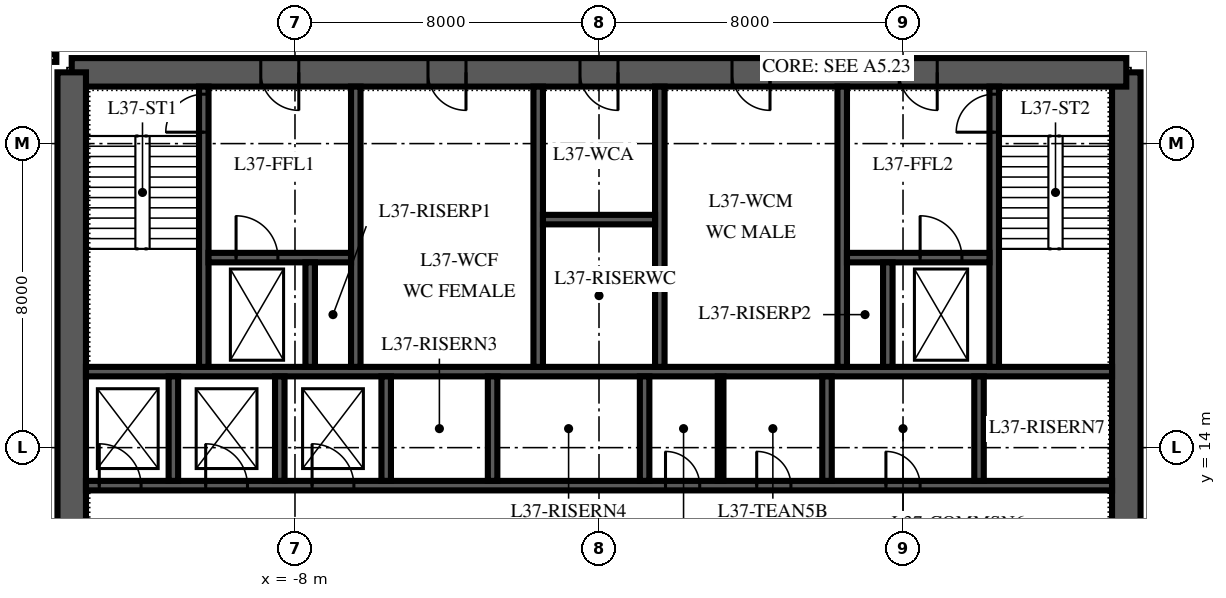
"""IFC4 building model, lengths in metres.
Left out: names, types, materials, properties, quantities, classifications, styles, units other than length and angle.
Written with IfcOpenShell. Run it as: python <this file> out.ifc"""

import sys

from ifc_helpers import new_model, si_unit, direction, frame, frame_2d, origin, place, context, subcontext, project, spatial, polyline, rectangle, outline, extrude, element, fill, save


model = new_model("IFC4")
c1 = context("Model", 3, precision=1e-05, world=origin(), true_north=direction((0.0, 1.0)))
c2 = subcontext(c1, "Body", "Model", "MODEL_VIEW")
j1 = project(units=[si_unit("LENGTHUNIT", "METRE"), si_unit("PLANEANGLEUNIT", "RADIAN")], contexts=[c1])
p1 = place(None, origin())
s1 = spatial("IfcSite", under=j1, at=p1, CompositionType="ELEMENT")
p2 = place(p1, origin())
s2 = spatial("IfcBuilding", under=s1, at=p2, CompositionType="ELEMENT")
p3 = place(p2, frame((0.0, 0.0, 163.0)))
s3 = spatial("IfcBuildingStorey", under=s2, at=p3, CompositionType="ELEMENT", Elevation=163.0)
p4 = place(p3, frame((13.875, 6.125, 0.0), z_axis=(0.0, 0.0, 1.0), x_axis=(0.0, 1.0, 0.0)))
e1 = element("IfcWall", 1, at=p4, inside=s3, PredefinedType="SHEAR", context=c2, shape_type="SweptSolid", body=[
    extrude(outline(polyline([(0.0, -0.375), (17.75, -0.375), (17.75, 0.0), (17.375, 0.0), (17.375, 0.375), (0.375, 0.375), (0.375, 0.0), (0.0, 0.0), (0.0, -0.375)])), origin(), (0.0, 0.0, 1.0), 4.0),
])
p5 = place(p4, frame((4.175, 0.0, 0.0)))
e2 = element("IfcOpeningElement", 2, at=p5, cuts=e1, PredefinedType="OPENING", context=c2, shape_type="SweptSolid", body=[
    extrude(rectangle(XDim=1.8, YDim=2.4, at=frame_2d((0.9, 1.2))), frame((0.0, 0.39, 0.0), z_axis=(0.0, -1.0, 0.0), x_axis=(1.0, 0.0, 0.0)), (0.0, 0.0, 1.0), 0.78),
])
p6 = place(p3, frame((13.875, 23.875, 0.0), z_axis=(0.0, 0.0, 1.0), x_axis=(-1.0, 0.0, 0.0)))
e3 = element("IfcWall", 3, at=p6, inside=s3, PredefinedType="SHEAR", context=c2, shape_type="SweptSolid", body=[
    extrude(rectangle(XDim=27.75, YDim=0.75, at=frame_2d((13.875, 0.0))), origin(), (0.0, 0.0, 1.0), 4.0),
])
p7 = place(p6, frame((21.775, 0.0, 0.0)))
e4 = element("IfcOpeningElement", 4, at=p7, cuts=e3, PredefinedType="OPENING", context=c2, shape_type="SweptSolid", body=[
    extrude(rectangle(XDim=1.0, YDim=2.1, at=frame_2d((0.5, 1.05))), frame((0.0, 0.39, 0.0), z_axis=(0.0, -1.0, 0.0), x_axis=(1.0, 0.0, 0.0)), (0.0, 0.0, 1.0), 0.78),
])
p8 = place(p6, frame((4.975, 0.0, 0.0)))
e5 = element("IfcOpeningElement", 5, at=p8, cuts=e3, PredefinedType="OPENING", context=c2, shape_type="SweptSolid", body=[
    extrude(rectangle(XDim=1.0, YDim=2.1, at=frame_2d((0.5, 1.05))), frame((0.0, 0.39, 0.0), z_axis=(0.0, -1.0, 0.0), x_axis=(1.0, 0.0, 0.0)), (0.0, 0.0, 1.0), 0.78),
])
p9 = place(p6, frame((17.375, 0.0, 0.0)))
e6 = element("IfcOpeningElement", 6, at=p9, cuts=e3, PredefinedType="OPENING", context=c2, shape_type="SweptSolid", body=[
    extrude(rectangle(XDim=1.0, YDim=2.1, at=frame_2d((0.5, 1.05))), frame((0.0, 0.39, 0.0), z_axis=(0.0, -1.0, 0.0), x_axis=(1.0, 0.0, 0.0)), (0.0, 0.0, 1.0), 0.78),
])
p10 = place(p6, frame((13.375, 0.0, 0.0)))
e7 = element("IfcOpeningElement", 7, at=p10, cuts=e3, PredefinedType="OPENING", context=c2, shape_type="SweptSolid", body=[
    extrude(rectangle(XDim=1.0, YDim=2.1, at=frame_2d((0.5, 1.05))), frame((0.0, 0.39, 0.0), z_axis=(0.0, -1.0, 0.0), x_axis=(1.0, 0.0, 0.0)), (0.0, 0.0, 1.0), 0.78),
])
p11 = place(p6, frame((9.375, 0.0, 0.0)))
e8 = element("IfcOpeningElement", 8, at=p11, cuts=e3, PredefinedType="OPENING", context=c2, shape_type="SweptSolid", body=[
    extrude(rectangle(XDim=1.0, YDim=2.1, at=frame_2d((0.5, 1.05))), frame((0.0, 0.39, 0.0), z_axis=(0.0, -1.0, 0.0), x_axis=(1.0, 0.0, 0.0)), (0.0, 0.0, 1.0), 0.78),
])
p12 = place(p3, frame((-13.875, 23.875, 0.0), z_axis=(0.0, 0.0, 1.0), x_axis=(0.0, -1.0, 0.0)))
e9 = element("IfcWall", 9, at=p12, inside=s3, PredefinedType="SHEAR", context=c2, shape_type="SweptSolid", body=[
    extrude(outline(polyline([(0.0, -0.375), (17.75, -0.375), (17.75, 0.0), (17.375, 0.0), (17.375, 0.375), (0.375, 0.375), (0.375, 0.0), (0.0, 0.0), (0.0, -0.375)])), origin(), (0.0, 0.0, 1.0), 4.0),
])
p13 = place(p12, frame((11.775, 0.0, 0.0)))
e10 = element("IfcOpeningElement", 10, at=p13, cuts=e9, PredefinedType="OPENING", context=c2, shape_type="SweptSolid", body=[
    extrude(rectangle(XDim=1.8, YDim=2.4, at=frame_2d((0.9, 1.2))), frame((0.0, 0.39, 0.0), z_axis=(0.0, -1.0, 0.0), x_axis=(1.0, 0.0, 0.0)), (0.0, 0.0, 1.0), 0.78),
])
p14 = place(p3, frame((-13.5, 13.0, 0.0), z_axis=(0.0, 0.0, 1.0), x_axis=(1.0, 0.0, 0.0)))
e11 = element("IfcWall", 11, at=p14, inside=s3, PredefinedType="SHEAR", context=c2, shape_type="SweptSolid", body=[
    extrude(rectangle(XDim=27.0, YDim=0.25, at=frame_2d((13.5, 0.0))), origin(), (0.0, 0.0, 1.0), 4.0),
])
p15 = place(p14, frame((0.35, 0.0, 0.0)))
e12 = element("IfcOpeningElement", 12, at=p15, cuts=e11, PredefinedType="OPENING", context=c2, shape_type="SweptSolid", body=[
    extrude(rectangle(XDim=1.1, YDim=2.1, at=frame_2d((0.55, 1.05))), frame((0.0, 0.14, 0.0), z_axis=(0.0, -1.0, 0.0), x_axis=(1.0, 0.0, 0.0)), (0.0, 0.0, 1.0), 0.28),
])
p16 = place(p14, frame((3.15, 0.0, 0.0)))
e13 = element("IfcOpeningElement", 13, at=p16, cuts=e11, PredefinedType="OPENING", context=c2, shape_type="SweptSolid", body=[
    extrude(rectangle(XDim=1.1, YDim=2.1, at=frame_2d((0.55, 1.05))), frame((0.0, 0.14, 0.0), z_axis=(0.0, -1.0, 0.0), x_axis=(1.0, 0.0, 0.0)), (0.0, 0.0, 1.0), 0.28),
])
p17 = place(p14, frame((5.95, 0.0, 0.0)))
e14 = element("IfcOpeningElement", 14, at=p17, cuts=e11, PredefinedType="OPENING", context=c2, shape_type="SweptSolid", body=[
    extrude(rectangle(XDim=1.1, YDim=2.1, at=frame_2d((0.55, 1.05))), frame((0.0, 0.14, 0.0), z_axis=(0.0, -1.0, 0.0), x_axis=(1.0, 0.0, 0.0)), (0.0, 0.0, 1.0), 0.28),
])
p18 = place(p14, frame((15.25, 0.0, 0.0)))
e15 = element("IfcOpeningElement", 15, at=p18, cuts=e11, PredefinedType="OPENING", context=c2, shape_type="SweptSolid", body=[
    extrude(rectangle(XDim=0.9, YDim=2.1, at=frame_2d((0.45, 1.05))), frame((0.0, 0.14, 0.0), z_axis=(0.0, -1.0, 0.0), x_axis=(1.0, 0.0, 0.0)), (0.0, 0.0, 1.0), 0.28),
])
p19 = place(p14, frame((17.65, 0.0, 0.0)))
e16 = element("IfcOpeningElement", 16, at=p19, cuts=e11, PredefinedType="OPENING", context=c2, shape_type="SweptSolid", body=[
    extrude(rectangle(XDim=0.9, YDim=2.1, at=frame_2d((0.45, 1.05))), frame((0.0, 0.14, 0.0), z_axis=(0.0, -1.0, 0.0), x_axis=(1.0, 0.0, 0.0)), (0.0, 0.0, 1.0), 0.28),
])
p20 = place(p14, frame((21.05, 0.0, 0.0)))
e17 = element("IfcOpeningElement", 17, at=p20, cuts=e11, PredefinedType="OPENING", context=c2, shape_type="SweptSolid", body=[
    extrude(rectangle(XDim=0.9, YDim=2.1, at=frame_2d((0.45, 1.05))), frame((0.0, 0.14, 0.0), z_axis=(0.0, -1.0, 0.0), x_axis=(1.0, 0.0, 0.0)), (0.0, 0.0, 1.0), 0.28),
])
p21 = place(p3, frame((-13.5, 16.0, 0.0), z_axis=(0.0, 0.0, 1.0), x_axis=(1.0, 0.0, 0.0)))
e18 = element("IfcWall", 18, at=p21, inside=s3, PredefinedType="SHEAR", context=c2, shape_type="SweptSolid", body=[
    extrude(rectangle(XDim=27.0, YDim=0.25, at=frame_2d((13.5, 0.0))), origin(), (0.0, 0.0, 1.0), 4.0),
])
for number, where, z_axis, x_axis in (
    (19, (-11.2, 13.125, 0.0), (0.0, 0.0, 1.0), (0.0, 1.0, 0.0)),
    (20, (-8.4, 13.125, 0.0), (0.0, 0.0, 1.0), (0.0, 1.0, 0.0)),
    (21, (-5.6, 13.125, 0.0), (0.0, 0.0, 1.0), (0.0, 1.0, 0.0)),
    (22, (-2.8, 13.125, 0.0), (0.0, 0.0, 1.0), (0.0, 1.0, 0.0)),
    (23, (1.2, 13.125, 0.0), (0.0, 0.0, 1.0), (0.0, 1.0, 0.0)),
    (24, (6.0, 13.125, 0.0), (0.0, 0.0, 1.0), (0.0, 1.0, 0.0)),
    (25, (10.0, 13.125, 0.0), (0.0, 0.0, 1.0), (0.0, 1.0, 0.0)),
):
    element("IfcWall", number, at=place(p3, frame(where, z_axis=z_axis, x_axis=x_axis)), inside=s3, PredefinedType="SHEAR", context=c2, shape_type="SweptSolid", body=[
        extrude(rectangle(XDim=2.75, YDim=0.25, at=frame_2d((1.375, 0.0))), origin(), (0.0, 0.0, 1.0), 4.0),
    ])
p22 = place(p3, frame((-10.4, 16.125, 0.0), z_axis=(0.0, 0.0, 1.0), x_axis=(0.0, 1.0, 0.0)))
e26 = element("IfcWall", 26, at=p22, inside=s3, PredefinedType="SHEAR", context=c2, shape_type="SweptSolid", body=[
    extrude(rectangle(XDim=7.375, YDim=0.25, at=frame_2d((3.688, 0.0))), origin(), (0.0, 0.0, 1.0), 4.0),
])
p23 = place(p22, frame((6.175, 0.0, 0.0)))
e27 = element("IfcOpeningElement", 27, at=p23, cuts=e26, PredefinedType="OPENING", context=c2, shape_type="SweptSolid", body=[
    extrude(rectangle(XDim=1.0, YDim=2.1, at=frame_2d((0.5, 1.05))), frame((0.0, 0.14, 0.0), z_axis=(0.0, -1.0, 0.0), x_axis=(1.0, 0.0, 0.0)), (0.0, 0.0, 1.0), 0.28),
])
for number, where, z_axis, x_axis in (
    (28, (-6.4, 16.125, 0.0), (0.0, 0.0, 1.0), (0.0, 1.0, 0.0)),
    (29, (-1.6, 16.125, 0.0), (0.0, 0.0, 1.0), (0.0, 1.0, 0.0)),
    (30, (1.6, 16.125, 0.0), (0.0, 0.0, 1.0), (0.0, 1.0, 0.0)),
    (31, (6.4, 16.125, 0.0), (0.0, 0.0, 1.0), (0.0, 1.0, 0.0)),
):
    element("IfcWall", number, at=place(p3, frame(where, z_axis=z_axis, x_axis=x_axis)), inside=s3, PredefinedType="SHEAR", context=c2, shape_type="SweptSolid", body=[
        extrude(rectangle(XDim=7.375, YDim=0.25, at=frame_2d((3.688, 0.0))), origin(), (0.0, 0.0, 1.0), 4.0),
    ])
p24 = place(p3, frame((10.4, 16.125, 0.0), z_axis=(0.0, 0.0, 1.0), x_axis=(0.0, 1.0, 0.0)))
e32 = element("IfcWall", 32, at=p24, inside=s3, PredefinedType="SHEAR", context=c2, shape_type="SweptSolid", body=[
    extrude(rectangle(XDim=7.375, YDim=0.25, at=frame_2d((3.688, 0.0))), origin(), (0.0, 0.0, 1.0), 4.0),
])
p25 = place(p24, frame((6.175, 0.0, 0.0)))
e33 = element("IfcOpeningElement", 33, at=p25, cuts=e32, PredefinedType="OPENING", context=c2, shape_type="SweptSolid", body=[
    extrude(rectangle(XDim=1.0, YDim=2.1, at=frame_2d((0.5, 1.05))), frame((0.0, 0.14, 0.0), z_axis=(0.0, -1.0, 0.0), x_axis=(1.0, 0.0, 0.0)), (0.0, 0.0, 1.0), 0.28),
])
p26 = place(p3, frame((-10.275, 19.0, 0.0), z_axis=(0.0, 0.0, 1.0), x_axis=(1.0, 0.0, 0.0)))
e34 = element("IfcWall", 34, at=p26, inside=s3, PredefinedType="SHEAR", context=c2, shape_type="SweptSolid", body=[
    extrude(rectangle(XDim=3.75, YDim=0.25, at=frame_2d((1.875, 0.0))), origin(), (0.0, 0.0, 1.0), 4.0),
])
p27 = place(p26, frame((0.725, 0.0, 0.0)))
e35 = element("IfcOpeningElement", 35, at=p27, cuts=e34, PredefinedType="OPENING", context=c2, shape_type="SweptSolid", body=[
    extrude(rectangle(XDim=1.1, YDim=2.1, at=frame_2d((0.55, 1.05))), frame((0.0, 0.14, 0.0), z_axis=(0.0, -1.0, 0.0), x_axis=(1.0, 0.0, 0.0)), (0.0, 0.0, 1.0), 0.28),
])
p28 = place(p3, frame((6.525, 19.0, 0.0), z_axis=(0.0, 0.0, 1.0), x_axis=(1.0, 0.0, 0.0)))
e36 = element("IfcWall", 36, at=p28, inside=s3, PredefinedType="SHEAR", context=c2, shape_type="SweptSolid", body=[
    extrude(rectangle(XDim=3.75, YDim=0.25, at=frame_2d((1.875, 0.0))), origin(), (0.0, 0.0, 1.0), 4.0),
])
p29 = place(p28, frame((1.925, 0.0, 0.0)))
e37 = element("IfcOpeningElement", 37, at=p29, cuts=e36, PredefinedType="OPENING", context=c2, shape_type="SweptSolid", body=[
    extrude(rectangle(XDim=1.1, YDim=2.1, at=frame_2d((0.55, 1.05))), frame((0.0, 0.14, 0.0), z_axis=(0.0, -1.0, 0.0), x_axis=(1.0, 0.0, 0.0)), (0.0, 0.0, 1.0), 0.28),
])
for number, where, z_axis, x_axis in (
    (38, (-7.6, 16.125, 0.0), (0.0, 0.0, 1.0), (0.0, 1.0, 0.0)),
    (39, (7.6, 16.125, 0.0), (0.0, 0.0, 1.0), (0.0, 1.0, 0.0)),
):
    element("IfcWall", number, at=place(p3, frame(where, z_axis=z_axis, x_axis=x_axis)), inside=s3, PredefinedType="SHEAR", context=c2, shape_type="SweptSolid", body=[
        extrude(rectangle(XDim=2.75, YDim=0.25, at=frame_2d((1.375, 0.0))), origin(), (0.0, 0.0, 1.0), 4.0),
    ])
p30 = place(p3, frame((-1.475, 20.0, 0.0), z_axis=(0.0, 0.0, 1.0), x_axis=(1.0, 0.0, 0.0)))
e40 = element("IfcWall", 40, at=p30, inside=s3, PredefinedType="SHEAR", context=c2, shape_type="SweptSolid", body=[
    extrude(rectangle(XDim=2.95, YDim=0.25, at=frame_2d((1.475, 0.0))), origin(), (0.0, 0.0, 1.0), 4.0),
])
p31 = place(p3, frame((3.2, 13.125, 0.0), z_axis=(0.0, 0.0, 1.0), x_axis=(0.0, 1.0, 0.0)))
e41 = element("IfcWall", 41, at=p31, inside=s3, PredefinedType="PARTITIONING", context=c2, shape_type="SweptSolid", body=[
    extrude(rectangle(XDim=2.75, YDim=0.15, at=frame_2d((1.375, 0.0))), origin(), (0.0, 0.0, 1.0), 3.85),
])
p32 = place(p3, frame((-16.1, 24.25, 0.0), z_axis=(0.0, 0.0, 1.0), x_axis=(1.0, 0.0, 0.0)))
e42 = element("IfcWall", 42, at=p32, inside=s3, PredefinedType="PARTITIONING", context=c2, shape_type="SweptSolid", body=[
    extrude(rectangle(XDim=1.82, YDim=0.2, at=frame_2d((0.91, 0.0))), origin(), (0.0, 0.0, 1.0), 3.318),
])
p33 = place(p7, origin())
e43 = element("IfcDoor", 43, at=p33, inside=s3, OperationType="SINGLE_SWING_RIGHT", PredefinedType="DOOR", context=c2, shape_type="SweptSolid", body=[
    extrude(rectangle(XDim=1.0, YDim=2.1, at=frame_2d((0.5, 1.05))), frame((0.0, 0.375, 0.0), z_axis=(0.0, -1.0, 0.0), x_axis=(1.0, 0.0, 0.0)), (0.0, 0.0, 1.0), 0.75),
])
fill(e4, e43)
p34 = place(p8, origin())
e44 = element("IfcDoor", 44, at=p34, inside=s3, OperationType="SINGLE_SWING_RIGHT", PredefinedType="DOOR", context=c2, shape_type="SweptSolid", body=[
    extrude(rectangle(XDim=1.0, YDim=2.1, at=frame_2d((0.5, 1.05))), frame((0.0, 0.375, 0.0), z_axis=(0.0, -1.0, 0.0), x_axis=(1.0, 0.0, 0.0)), (0.0, 0.0, 1.0), 0.75),
])
fill(e5, e44)
p35 = place(p9, origin())
e45 = element("IfcDoor", 45, at=p35, inside=s3, OperationType="SINGLE_SWING_LEFT", PredefinedType="DOOR", context=c2, shape_type="SweptSolid", body=[
    extrude(rectangle(XDim=1.0, YDim=2.1, at=frame_2d((0.5, 1.05))), frame((0.0, 0.375, 0.0), z_axis=(0.0, -1.0, 0.0), x_axis=(1.0, 0.0, 0.0)), (0.0, 0.0, 1.0), 0.75),
])
fill(e6, e45)
p36 = place(p10, origin())
e46 = element("IfcDoor", 46, at=p36, inside=s3, OperationType="SINGLE_SWING_LEFT", PredefinedType="DOOR", context=c2, shape_type="SweptSolid", body=[
    extrude(rectangle(XDim=1.0, YDim=2.1, at=frame_2d((0.5, 1.05))), frame((0.0, 0.375, 0.0), z_axis=(0.0, -1.0, 0.0), x_axis=(1.0, 0.0, 0.0)), (0.0, 0.0, 1.0), 0.75),
])
fill(e7, e46)
p37 = place(p11, origin())
e47 = element("IfcDoor", 47, at=p37, inside=s3, OperationType="SINGLE_SWING_LEFT", PredefinedType="DOOR", context=c2, shape_type="SweptSolid", body=[
    extrude(rectangle(XDim=1.0, YDim=2.1, at=frame_2d((0.5, 1.05))), frame((0.0, 0.375, 0.0), z_axis=(0.0, -1.0, 0.0), x_axis=(1.0, 0.0, 0.0)), (0.0, 0.0, 1.0), 0.75),
])
fill(e8, e47)
p38 = place(p23, origin())
e48 = element("IfcDoor", 48, at=p38, inside=s3, OperationType="SINGLE_SWING_LEFT", PredefinedType="DOOR", context=c2, shape_type="SweptSolid", body=[
    extrude(rectangle(XDim=1.0, YDim=2.1, at=frame_2d((0.5, 1.05))), frame((0.0, 0.125, 0.0), z_axis=(0.0, -1.0, 0.0), x_axis=(1.0, 0.0, 0.0)), (0.0, 0.0, 1.0), 0.25),
])
fill(e27, e48)
p39 = place(p25, origin())
e49 = element("IfcDoor", 49, at=p39, inside=s3, OperationType="SINGLE_SWING_LEFT", PredefinedType="DOOR", context=c2, shape_type="SweptSolid", body=[
    extrude(rectangle(XDim=1.0, YDim=2.1, at=frame_2d((0.5, 1.05))), frame((0.0, 0.125, 0.0), z_axis=(0.0, -1.0, 0.0), x_axis=(1.0, 0.0, 0.0)), (0.0, 0.0, 1.0), 0.25),
])
fill(e33, e49)
p40 = place(p15, origin())
e50 = element("IfcDoor", 50, at=p40, inside=s3, OperationType="SLIDING_TO_LEFT", PredefinedType="DOOR", context=c2, shape_type="SweptSolid", body=[
    extrude(rectangle(XDim=1.1, YDim=2.1, at=frame_2d((0.55, 1.05))), frame((0.0, 0.125, 0.0), z_axis=(0.0, -1.0, 0.0), x_axis=(1.0, 0.0, 0.0)), (0.0, 0.0, 1.0), 0.25),
])
fill(e12, e50)
p41 = place(p16, origin())
e51 = element("IfcDoor", 51, at=p41, inside=s3, OperationType="SLIDING_TO_LEFT", PredefinedType="DOOR", context=c2, shape_type="SweptSolid", body=[
    extrude(rectangle(XDim=1.1, YDim=2.1, at=frame_2d((0.55, 1.05))), frame((0.0, 0.125, 0.0), z_axis=(0.0, -1.0, 0.0), x_axis=(1.0, 0.0, 0.0)), (0.0, 0.0, 1.0), 0.25),
])
fill(e13, e51)
p42 = place(p17, origin())
e52 = element("IfcDoor", 52, at=p42, inside=s3, OperationType="SLIDING_TO_LEFT", PredefinedType="DOOR", context=c2, shape_type="SweptSolid", body=[
    extrude(rectangle(XDim=1.1, YDim=2.1, at=frame_2d((0.55, 1.05))), frame((0.0, 0.125, 0.0), z_axis=(0.0, -1.0, 0.0), x_axis=(1.0, 0.0, 0.0)), (0.0, 0.0, 1.0), 0.25),
])
fill(e14, e52)
p43 = place(p29, origin())
e53 = element("IfcDoor", 53, at=p43, inside=s3, OperationType="SLIDING_TO_RIGHT", PredefinedType="DOOR", context=c2, shape_type="SweptSolid", body=[
    extrude(rectangle(XDim=1.1, YDim=2.1, at=frame_2d((0.55, 1.05))), frame((0.0, 0.125, 0.0), z_axis=(0.0, -1.0, 0.0), x_axis=(1.0, 0.0, 0.0)), (0.0, 0.0, 1.0), 0.25),
])
fill(e37, e53)
p44 = place(p27, origin())
e54 = element("IfcDoor", 54, at=p44, inside=s3, OperationType="SLIDING_TO_RIGHT", PredefinedType="DOOR", context=c2, shape_type="SweptSolid", body=[
    extrude(rectangle(XDim=1.1, YDim=2.1, at=frame_2d((0.55, 1.05))), frame((0.0, 0.125, 0.0), z_axis=(0.0, -1.0, 0.0), x_axis=(1.0, 0.0, 0.0)), (0.0, 0.0, 1.0), 0.25),
])
fill(e35, e54)
p45 = place(p18, origin())
e55 = element("IfcDoor", 55, at=p45, inside=s3, OperationType="SINGLE_SWING_LEFT", PredefinedType="DOOR", context=c2, shape_type="SweptSolid", body=[
    extrude(rectangle(XDim=0.9, YDim=2.1, at=frame_2d((0.45, 1.05))), frame((0.0, 0.125, 0.0), z_axis=(0.0, -1.0, 0.0), x_axis=(1.0, 0.0, 0.0)), (0.0, 0.0, 1.0), 0.25),
])
fill(e15, e55)
p46 = place(p19, origin())
e56 = element("IfcDoor", 56, at=p46, inside=s3, OperationType="SINGLE_SWING_LEFT", PredefinedType="DOOR", context=c2, shape_type="SweptSolid", body=[
    extrude(rectangle(XDim=0.9, YDim=2.1, at=frame_2d((0.45, 1.05))), frame((0.0, 0.125, 0.0), z_axis=(0.0, -1.0, 0.0), x_axis=(1.0, 0.0, 0.0)), (0.0, 0.0, 1.0), 0.25),
])
fill(e16, e56)
p47 = place(p20, origin())
e57 = element("IfcDoor", 57, at=p47, inside=s3, OperationType="SINGLE_SWING_LEFT", PredefinedType="DOOR", context=c2, shape_type="SweptSolid", body=[
    extrude(rectangle(XDim=0.9, YDim=2.1, at=frame_2d((0.45, 1.05))), frame((0.0, 0.125, 0.0), z_axis=(0.0, -1.0, 0.0), x_axis=(1.0, 0.0, 0.0)), (0.0, 0.0, 1.0), 0.25),
])
fill(e17, e57)
save(model, sys.argv[1])
